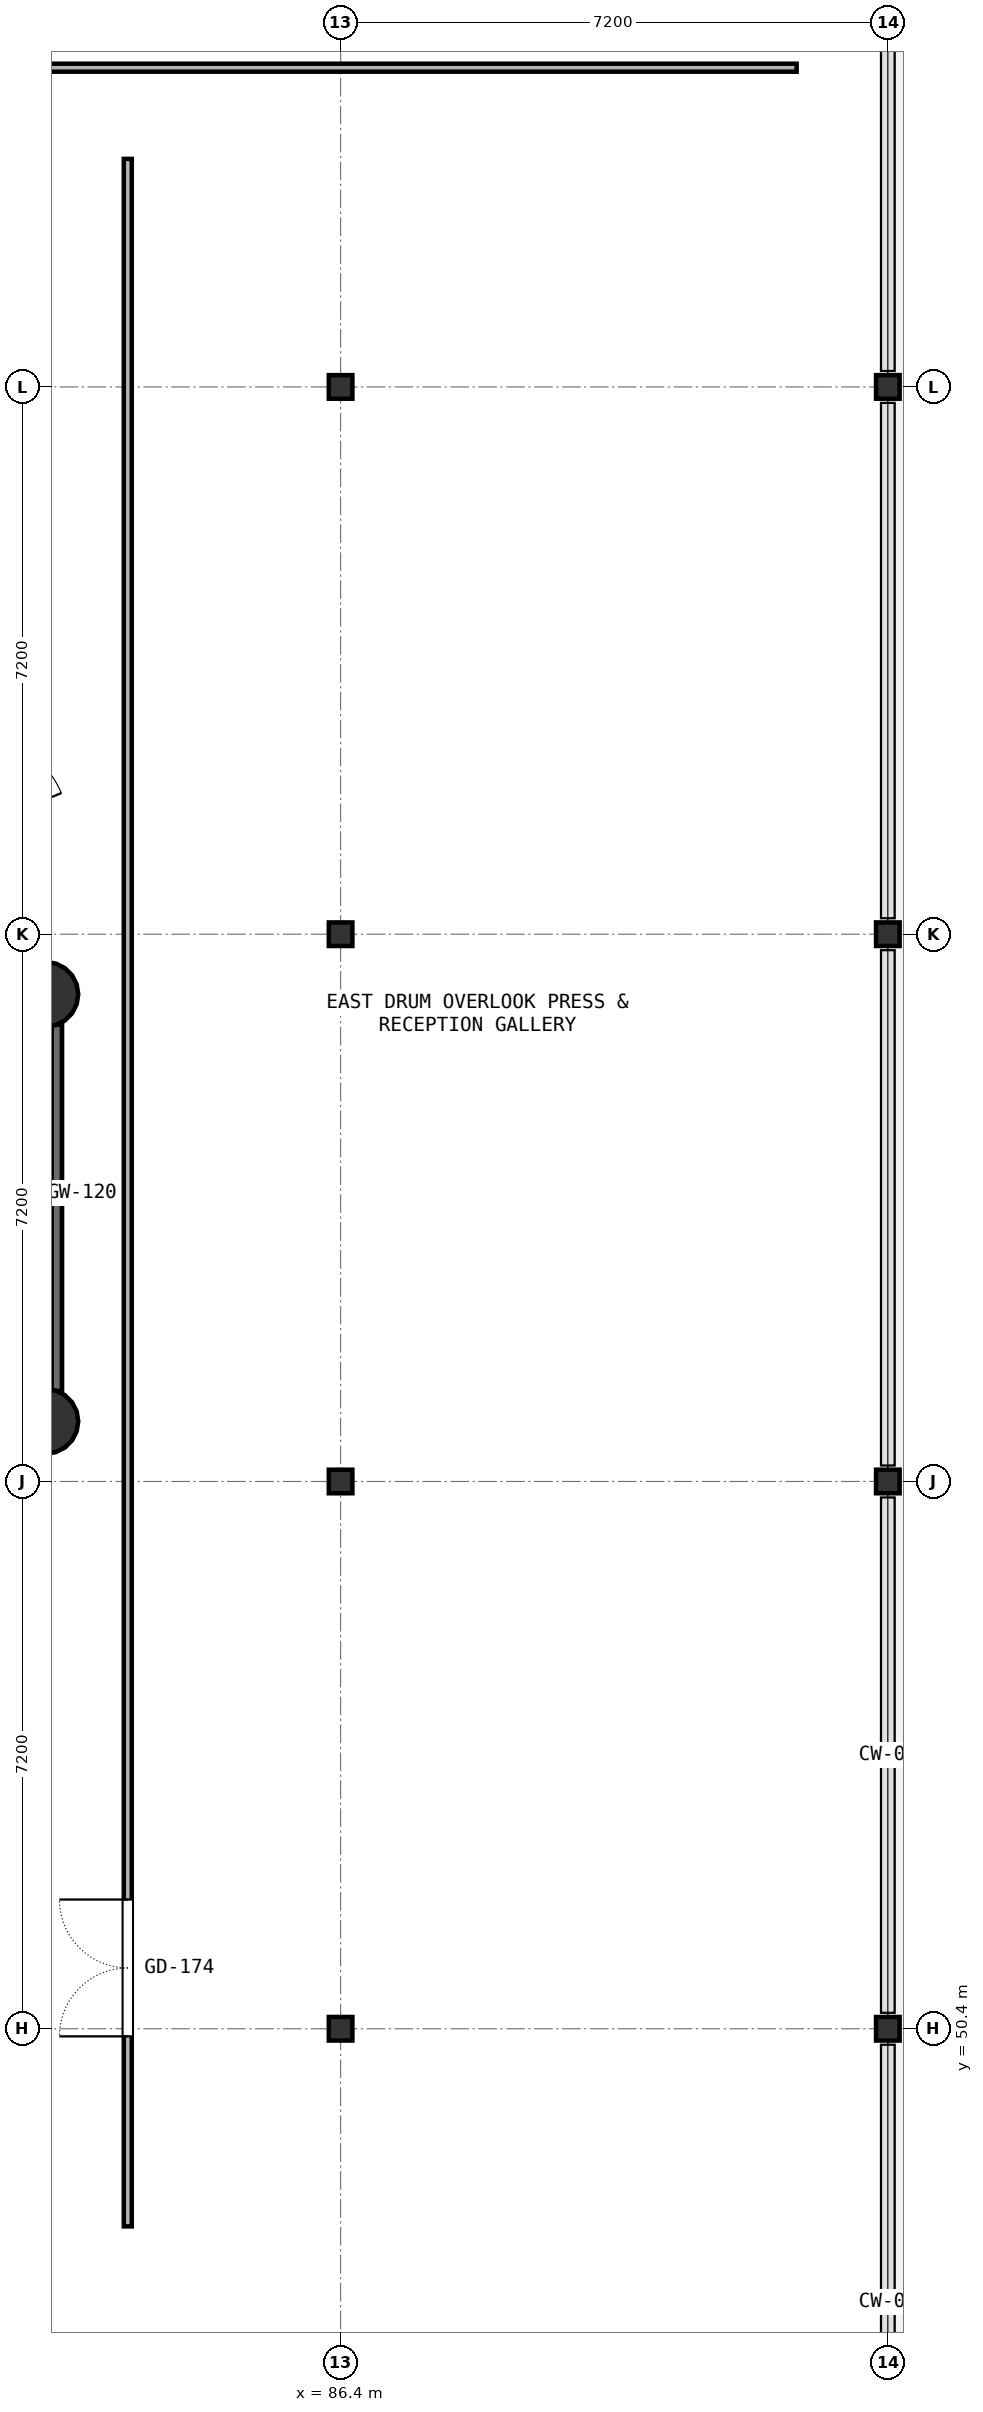
"""IFC4 building model, lengths in metres.
Left out: names, types, materials, properties, quantities, classifications, styles, units other than length and angle.
Written with IfcOpenShell. Run it as: python <this file> out.ifc"""

import sys

from ifc_helpers import new_model, si_unit, direction, frame, frame_2d, origin, origin_2d, place, context, subcontext, project, spatial, rectangle, hollow_rectangle, circle, extrude, element, fill, save


model = new_model("IFC4")
c1 = context("Model", 3, precision=1e-05, world=origin(), true_north=direction((0.0, 1.0)))
c2 = subcontext(c1, "Body", "Model", "MODEL_VIEW")
j1 = project(units=[si_unit("LENGTHUNIT", "METRE"), si_unit("PLANEANGLEUNIT", "RADIAN")], contexts=[c1])
p1 = place(None, origin())
s1 = spatial("IfcSite", under=j1, at=p1, CompositionType="ELEMENT")
p2 = place(p1, origin())
s2 = spatial("IfcBuilding", under=s1, at=p2, CompositionType="ELEMENT")
p3 = place(p2, frame((0.0, 0.0, 14.4)))
s3 = spatial("IfcBuildingStorey", under=s2, at=p3, CompositionType="ELEMENT", Elevation=14.4)
for number, where, z_axis, x_axis in (
    (1, (82.523, 64.009, 0.0), (0.0, 0.0, 1.0), (1.0, 0.0, 0.0)),
    (2, (82.523, 58.391, 0.0), (0.0, 0.0, 1.0), (1.0, 0.0, 0.0)),
):
    element("IfcColumn", number, at=place(p3, frame(where, z_axis=z_axis, x_axis=x_axis)), inside=s3, PredefinedType="COLUMN", context=c2, shape_type="SweptSolid", body=[
        extrude(circle(Radius=0.425, at=origin_2d()), origin(), (0.0, 0.0, 1.0), 4.2),
    ])
for number, where, z_axis, x_axis in (
    (3, (86.4, 50.4, 0.0), (0.0, 0.0, 1.0), (1.0, 0.0, 0.0)),
    (4, (86.4, 57.6, 0.0), (0.0, 0.0, 1.0), (1.0, 0.0, 0.0)),
    (5, (86.4, 64.8, 0.0), (0.0, 0.0, 1.0), (1.0, 0.0, 0.0)),
    (6, (86.4, 72.0, 0.0), (0.0, 0.0, 1.0), (1.0, 0.0, 0.0)),
    (7, (93.6, 50.4, 0.0), (0.0, 0.0, 1.0), (1.0, 0.0, 0.0)),
    (8, (93.6, 57.6, 0.0), (0.0, 0.0, 1.0), (1.0, 0.0, 0.0)),
    (9, (93.6, 64.8, 0.0), (0.0, 0.0, 1.0), (1.0, 0.0, 0.0)),
    (10, (93.6, 72.0, 0.0), (0.0, 0.0, 1.0), (1.0, 0.0, 0.0)),
):
    element("IfcColumn", number, at=place(p3, frame(where, z_axis=z_axis, x_axis=x_axis)), inside=s3, PredefinedType="COLUMN", context=c2, shape_type="SweptSolid", body=[
        extrude(hollow_rectangle(XDim=0.31, YDim=0.31, WallThickness=0.012, InnerFilletRadius=0.012, OuterFilletRadius=0.024, at=origin_2d()), origin(), (0.0, 0.0, 1.0), 4.2),
    ])
p4 = place(p3, frame((82.523, 63.609, 0.0), z_axis=(0.0, 0.0, 1.0), x_axis=(0.0, -1.0, 0.0)))
e11 = element("IfcWall", 11, at=p4, inside=s3, PredefinedType="SHEAR", context=c2, shape_type="SweptSolid", body=[
    extrude(rectangle(XDim=4.819, YDim=0.42, at=frame_2d((2.409, 0.0))), origin(), (0.0, 0.0, 1.0), 0.82),
])
p5 = place(p3, frame((82.523, 63.609, 2.88), z_axis=(0.0, 0.0, 1.0), x_axis=(0.0, -1.0, 0.0)))
e12 = element("IfcWall", 12, at=p5, inside=s3, PredefinedType="SHEAR", context=c2, shape_type="SweptSolid", body=[
    extrude(rectangle(XDim=4.819, YDim=0.42, at=frame_2d((2.409, 0.0))), origin(), (0.0, 0.0, 1.0), 1.32),
])
p6 = place(p3, frame((44.4, 76.2, 0.0), z_axis=(0.0, 0.0, 1.0), x_axis=(1.0, 0.0, 0.0)))
e13 = element("IfcWall", 13, at=p6, inside=s3, PredefinedType="PARTITIONING", context=c2, shape_type="SweptSolid", body=[
    extrude(rectangle(XDim=48.0, YDim=0.105, at=frame_2d((24.0, 0.0))), origin(), (0.0, 0.0, 1.0), 3.08),
])
p7 = place(p6, frame((2.5, 0.0, 0.0)))
e14 = element("IfcOpeningElement", 14, at=p7, cuts=e13, PredefinedType="OPENING", context=c2, shape_type="SweptSolid", body=[
    extrude(rectangle(XDim=1.8, YDim=2.2, at=frame_2d((0.9, 1.1))), frame((0.0, 0.062, 0.0), z_axis=(0.0, -1.0, 0.0), x_axis=(1.0, 0.0, 0.0)), (0.0, 0.0, 1.0), 0.125),
])
p8 = place(p3, frame((83.6, 47.8, 0.0), z_axis=(0.0, 0.0, 1.0), x_axis=(0.0, 1.0, 0.0)))
e15 = element("IfcWall", 15, at=p8, inside=s3, PredefinedType="PARTITIONING", context=c2, shape_type="SweptSolid", body=[
    extrude(rectangle(XDim=27.2, YDim=0.105, at=frame_2d((13.6, 0.0))), origin(), (0.0, 0.0, 1.0), 3.08),
])
p9 = place(p8, frame((2.5, 0.0, 0.0)))
e16 = element("IfcOpeningElement", 16, at=p9, cuts=e15, PredefinedType="OPENING", context=c2, shape_type="SweptSolid", body=[
    extrude(rectangle(XDim=1.8, YDim=2.2, at=frame_2d((0.9, 1.1))), frame((0.0, 0.062, 0.0), z_axis=(0.0, -1.0, 0.0), x_axis=(1.0, 0.0, 0.0)), (0.0, 0.0, 1.0), 0.125),
])
p10 = place(p9, origin())
e17 = element("IfcDoor", 17, at=p10, inside=s3, OperationType="DOUBLE_DOOR_SINGLE_SWING", PredefinedType="DOOR", context=c2, shape_type="SweptSolid", body=[
    extrude(rectangle(XDim=1.8, YDim=2.2, at=frame_2d((0.9, 1.1))), frame((0.0, 0.025, 0.0), z_axis=(0.0, -1.0, 0.0), x_axis=(1.0, 0.0, 0.0)), (0.0, 0.0, 1.0), 0.05),
])
fill(e16, e17)
save(model, sys.argv[1])
